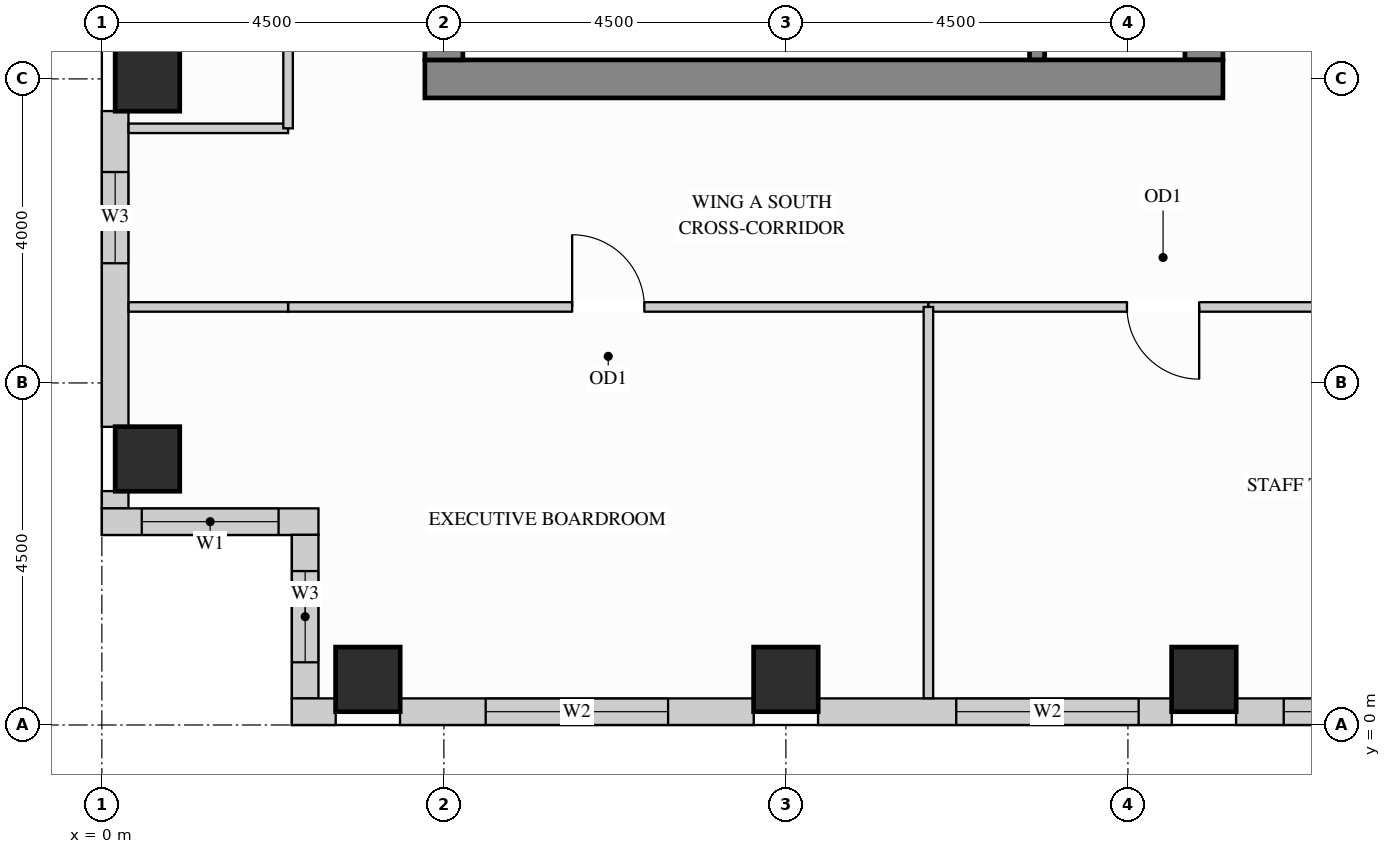
"""IFC4 building model, lengths in metres.
Left out: names, types, materials, properties, quantities, classifications, styles, units other than length and angle.
Written with IfcOpenShell. Run it as: python <this file> out.ifc"""

import sys

from ifc_helpers import new_model, si_unit, direction, frame, frame_2d, origin, origin_2d, place, context, subcontext, project, spatial, rectangle, extrude, source, transform, mapped, element, fill, save


model = new_model("IFC4")
c1 = context("Model", 3, precision=1e-05, world=origin(), true_north=direction((0.0, 1.0)))
c2 = subcontext(c1, "Body", "Model", "MODEL_VIEW")
j1 = project(units=[si_unit("LENGTHUNIT", "METRE"), si_unit("PLANEANGLEUNIT", "RADIAN")], contexts=[c1])
p1 = place(None, origin())
s1 = spatial("IfcSite", under=j1, at=p1, CompositionType="ELEMENT")
p2 = place(p1, origin())
s2 = spatial("IfcBuilding", under=s1, at=p2, CompositionType="ELEMENT")
p3 = place(p2, frame((0.0, 0.0, 237.6)))
s3 = spatial("IfcBuildingStorey", under=s2, at=p3, CompositionType="ELEMENT", Elevation=237.6)
m1 = source(origin(), c2, "Body", "SweptSolid", [
    extrude(rectangle(XDim=0.85, YDim=0.85, at=origin_2d()), origin(), (0.0, 0.0, 1.0), 3.4),
])
for number, where, z_axis, x_axis in (
    (1, (14.5, 0.6, 0.0), (0.0, 0.0, 1.0), (1.0, 0.0, 0.0)),
    (2, (3.5, 0.6, 0.0), (0.0, 0.0, 1.0), (1.0, 0.0, 0.0)),
    (3, (9.0, 0.6, 0.0), (0.0, 0.0, 1.0), (1.0, 0.0, 0.0)),
    (4, (0.6, 3.5, 0.0), (0.0, 0.0, 1.0), (1.0, 0.0, 0.0)),
    (5, (0.6, 8.5, 0.0), (0.0, 0.0, 1.0), (1.0, 0.0, 0.0)),
):
    element("IfcColumn", number, at=place(p3, frame(where, z_axis=z_axis, x_axis=x_axis)), inside=s3, PredefinedType="COLUMN", context=c2, shape_type="MappedRepresentation", body=[
        mapped(m1, transform((0.0, 0.0, 0.0), x_axis=(1.0, 0.0, 0.0), y_axis=(0.0, 1.0, 0.0), z_axis=(0.0, 0.0, 1.0))),
    ])
m2 = source(origin(), c2, "Body", "SweptSolid", [
    extrude(rectangle(XDim=10.07, YDim=0.5, at=frame_2d((5.035, 0.0))), origin(), (0.0, 0.0, 1.0), 3.4),
])
p4 = place(p3, frame((14.5, 8.75, 0.0), z_axis=(0.0, 0.0, 1.0), x_axis=(0.0, 1.0, 0.0)))
e6 = element("IfcWall", 6, at=p4, inside=s3, PredefinedType="SHEAR", context=c2, shape_type="MappedRepresentation", body=[
    mapped(m2, transform((0.0, 0.0, 0.0), x_axis=(1.0, 0.0, 0.0), y_axis=(0.0, 1.0, 0.0), z_axis=(0.0, 0.0, 1.0))),
])
m3 = source(origin(), c2, "Body", "SweptSolid", [
    extrude(rectangle(XDim=10.5, YDim=0.5, at=frame_2d((5.25, 0.0))), origin(), (0.0, 0.0, 1.0), 3.4),
])
p5 = place(p3, frame((4.25, 8.5, 0.0), z_axis=(0.0, 0.0, 1.0), x_axis=(1.0, 0.0, 0.0)))
e7 = element("IfcWall", 7, at=p5, inside=s3, PredefinedType="SHEAR", context=c2, shape_type="MappedRepresentation", body=[
    mapped(m3, transform((0.0, 0.0, 0.0), x_axis=(1.0, 0.0, 0.0), y_axis=(0.0, 1.0, 0.0), z_axis=(0.0, 0.0, 1.0))),
])
m4 = source(origin(), c2, "Body", "SweptSolid", [
    extrude(rectangle(XDim=20.5, YDim=0.5, at=frame_2d((10.25, 0.0))), origin(), (0.0, 0.0, 1.0), 3.4),
])
p6 = place(p3, frame((4.5, 8.75, 0.0), z_axis=(0.0, 0.0, 1.0), x_axis=(0.0, 1.0, 0.0)))
e8 = element("IfcWall", 8, at=p6, inside=s3, PredefinedType="SHEAR", context=c2, shape_type="MappedRepresentation", body=[
    mapped(m4, transform((0.0, 0.0, 0.0), x_axis=(1.0, 0.0, 0.0), y_axis=(0.0, 1.0, 0.0), z_axis=(0.0, 0.0, 1.0))),
])
p7 = place(p3, frame((0.175, 8.077, 0.0), z_axis=(0.0, 0.0, 1.0), x_axis=(0.0, -1.0, 0.0)))
e9 = element("IfcWall", 9, at=p7, inside=s3, PredefinedType="SOLIDWALL", context=c2, shape_type="SweptSolid", body=[
    extrude(rectangle(XDim=4.154, YDim=0.35, at=frame_2d((2.077, 0.0))), origin(), (0.0, 0.0, 1.0), 3.385),
])
p8 = place(p7, frame((0.802, 0.0, 0.78)))
e10 = element("IfcOpeningElement", 10, at=p8, cuts=e9, PredefinedType="OPENING", context=c2, shape_type="SweptSolid", body=[
    extrude(rectangle(XDim=1.2, YDim=2.1, at=frame_2d((0.6, 1.05))), frame((0.0, 0.185, 0.0), z_axis=(0.0, -1.0, 0.0), x_axis=(1.0, 0.0, 0.0)), (0.0, 0.0, 1.0), 0.37),
])
m5 = source(origin(), c2, "Body", "SweptSolid", [
    extrude(rectangle(XDim=0.229, YDim=0.35, at=frame_2d((0.115, 0.0))), origin(), (0.0, 0.0, 1.0), 3.385),
])
p9 = place(p3, frame((0.175, 3.077, 0.0), z_axis=(0.0, 0.0, 1.0), x_axis=(0.0, -1.0, 0.0)))
e11 = element("IfcWall", 11, at=p9, inside=s3, PredefinedType="SOLIDWALL", context=c2, shape_type="MappedRepresentation", body=[
    mapped(m5, transform((0.0, 0.0, 0.0), x_axis=(1.0, 0.0, 0.0), y_axis=(0.0, 1.0, 0.0), z_axis=(0.0, 0.0, 1.0))),
])
p10 = place(p3, frame((0.0, 2.675, 0.0), z_axis=(0.0, 0.0, 1.0), x_axis=(1.0, 0.0, 0.0)))
e12 = element("IfcWall", 12, at=p10, inside=s3, PredefinedType="SOLIDWALL", context=c2, shape_type="SweptSolid", body=[
    extrude(rectangle(XDim=2.85, YDim=0.35, at=frame_2d((1.425, 0.0))), origin(), (0.0, 0.0, 1.0), 3.385),
])
p11 = place(p10, frame((0.525, 0.0, 0.78)))
e13 = element("IfcOpeningElement", 13, at=p11, cuts=e12, PredefinedType="OPENING", context=c2, shape_type="SweptSolid", body=[
    extrude(rectangle(XDim=1.8, YDim=2.1, at=frame_2d((0.9, 1.05))), frame((0.0, 0.185, 0.0), z_axis=(0.0, -1.0, 0.0), x_axis=(1.0, 0.0, 0.0)), (0.0, 0.0, 1.0), 0.37),
])
p12 = place(p3, frame((2.675, 2.502, 0.0), z_axis=(0.0, 0.0, 1.0), x_axis=(0.0, -1.0, 0.0)))
e14 = element("IfcWall", 14, at=p12, inside=s3, PredefinedType="SOLIDWALL", context=c2, shape_type="SweptSolid", body=[
    extrude(rectangle(XDim=2.154, YDim=0.35, at=frame_2d((1.077, 0.0))), origin(), (0.0, 0.0, 1.0), 3.385),
])
p13 = place(p12, frame((0.477, 0.0, 0.78)))
e15 = element("IfcOpeningElement", 15, at=p13, cuts=e14, PredefinedType="OPENING", context=c2, shape_type="SweptSolid", body=[
    extrude(rectangle(XDim=1.2, YDim=2.1, at=frame_2d((0.6, 1.05))), frame((0.0, 0.185, 0.0), z_axis=(0.0, -1.0, 0.0), x_axis=(1.0, 0.0, 0.0)), (0.0, 0.0, 1.0), 0.37),
])
m6 = source(origin(), c2, "Body", "SweptSolid", [
    extrude(rectangle(XDim=0.577, YDim=0.35, at=frame_2d((0.289, 0.0))), origin(), (0.0, 0.0, 1.0), 3.385),
])
p14 = place(p3, frame((2.5, 0.175, 0.0), z_axis=(0.0, 0.0, 1.0), x_axis=(1.0, 0.0, 0.0)))
e16 = element("IfcWall", 16, at=p14, inside=s3, PredefinedType="SOLIDWALL", context=c2, shape_type="MappedRepresentation", body=[
    mapped(m6, transform((0.0, 0.0, 0.0), x_axis=(1.0, 0.0, 0.0), y_axis=(0.0, 1.0, 0.0), z_axis=(0.0, 0.0, 1.0))),
])
p15 = place(p3, frame((3.923, 0.175, 0.0), z_axis=(0.0, 0.0, 1.0), x_axis=(1.0, 0.0, 0.0)))
e17 = element("IfcWall", 17, at=p15, inside=s3, PredefinedType="SOLIDWALL", context=c2, shape_type="SweptSolid", body=[
    extrude(rectangle(XDim=4.654, YDim=0.35, at=frame_2d((2.327, 0.0))), origin(), (0.0, 0.0, 1.0), 3.385),
])
p16 = place(p15, frame((1.127, 0.0, 0.78)))
e18 = element("IfcOpeningElement", 18, at=p16, cuts=e17, PredefinedType="OPENING", context=c2, shape_type="SweptSolid", body=[
    extrude(rectangle(XDim=2.4, YDim=2.1, at=frame_2d((1.2, 1.05))), frame((0.0, 0.185, 0.0), z_axis=(0.0, -1.0, 0.0), x_axis=(1.0, 0.0, 0.0)), (0.0, 0.0, 1.0), 0.37),
])
p17 = place(p3, frame((9.423, 0.175, 0.0), z_axis=(0.0, 0.0, 1.0), x_axis=(1.0, 0.0, 0.0)))
e19 = element("IfcWall", 19, at=p17, inside=s3, PredefinedType="SOLIDWALL", context=c2, shape_type="SweptSolid", body=[
    extrude(rectangle(XDim=4.654, YDim=0.35, at=frame_2d((2.327, 0.0))), origin(), (0.0, 0.0, 1.0), 3.385),
])
p18 = place(p17, frame((1.818, 0.0, 0.78)))
e20 = element("IfcOpeningElement", 20, at=p18, cuts=e19, PredefinedType="OPENING", context=c2, shape_type="SweptSolid", body=[
    extrude(rectangle(XDim=2.4, YDim=2.1, at=frame_2d((1.2, 1.05))), frame((0.0, 0.185, 0.0), z_axis=(0.0, -1.0, 0.0), x_axis=(1.0, 0.0, 0.0)), (0.0, 0.0, 1.0), 0.37),
])
p19 = place(p3, frame((14.923, 0.175, 0.0), z_axis=(0.0, 0.0, 1.0), x_axis=(1.0, 0.0, 0.0)))
e21 = element("IfcWall", 21, at=p19, inside=s3, PredefinedType="SOLIDWALL", context=c2, shape_type="SweptSolid", body=[
    extrude(rectangle(XDim=3.654, YDim=0.35, at=frame_2d((1.827, 0.0))), origin(), (0.0, 0.0, 1.0), 3.385),
])
p20 = place(p19, frame((0.627, 0.0, 0.78)))
e22 = element("IfcOpeningElement", 22, at=p20, cuts=e21, PredefinedType="OPENING", context=c2, shape_type="SweptSolid", body=[
    extrude(rectangle(XDim=2.4, YDim=2.1, at=frame_2d((1.2, 1.05))), frame((0.0, 0.185, 0.0), z_axis=(0.0, -1.0, 0.0), x_axis=(1.0, 0.0, 0.0)), (0.0, 0.0, 1.0), 0.37),
])
m7 = source(origin(), c2, "Body", "SweptSolid", [
    extrude(rectangle(XDim=2.098, YDim=0.125, at=frame_2d((1.049, 0.0))), origin(), (0.0, 0.0, 1.0), 3.385),
])
p21 = place(p3, frame((0.352, 7.85, 0.0), z_axis=(0.0, 0.0, 1.0), x_axis=(1.0, 0.0, 0.0)))
e23 = element("IfcWall", 23, at=p21, inside=s3, PredefinedType="PARTITIONING", context=c2, shape_type="MappedRepresentation", body=[
    mapped(m7, transform((0.0, 0.0, 0.0), x_axis=(1.0, 0.0, 0.0), y_axis=(0.0, 1.0, 0.0), z_axis=(0.0, 0.0, 1.0))),
])
p22 = place(p3, frame((2.45, 5.5, 0.0), z_axis=(0.0, 0.0, 1.0), x_axis=(1.0, 0.0, 0.0)))
e24 = element("IfcWall", 24, at=p22, inside=s3, PredefinedType="PARTITIONING", context=c2, shape_type="SweptSolid", body=[
    extrude(rectangle(XDim=8.425, YDim=0.125, at=frame_2d((4.212, 0.0))), origin(), (0.0, 0.0, 1.0), 3.385),
])
p23 = place(p22, frame((3.738, 0.0, 0.0)))
e25 = element("IfcOpeningElement", 25, at=p23, cuts=e24, PredefinedType="OPENING", context=c2, shape_type="SweptSolid", body=[
    extrude(rectangle(XDim=0.95, YDim=2.15, at=frame_2d((0.475, 1.075))), frame((0.0, 0.073, 0.0), z_axis=(0.0, -1.0, 0.0), x_axis=(1.0, 0.0, 0.0)), (0.0, 0.0, 1.0), 0.145),
])
p24 = place(p3, frame((10.875, 5.5, 0.0), z_axis=(0.0, 0.0, 1.0), x_axis=(1.0, 0.0, 0.0)))
e26 = element("IfcWall", 26, at=p24, inside=s3, PredefinedType="PARTITIONING", context=c2, shape_type="SweptSolid", body=[
    extrude(rectangle(XDim=6.175, YDim=0.125, at=frame_2d((3.087, 0.0))), origin(), (0.0, 0.0, 1.0), 3.385),
])
p25 = place(p24, frame((2.613, 0.0, 0.0)))
e27 = element("IfcOpeningElement", 27, at=p25, cuts=e26, PredefinedType="OPENING", context=c2, shape_type="SweptSolid", body=[
    extrude(rectangle(XDim=0.95, YDim=2.15, at=frame_2d((0.475, 1.075))), frame((0.0, 0.073, 0.0), z_axis=(0.0, -1.0, 0.0), x_axis=(1.0, 0.0, 0.0)), (0.0, 0.0, 1.0), 0.145),
])
p26 = place(p3, frame((0.352, 5.5, 0.0), z_axis=(0.0, 0.0, 1.0), x_axis=(1.0, 0.0, 0.0)))
e28 = element("IfcWall", 28, at=p26, inside=s3, PredefinedType="PARTITIONING", context=c2, shape_type="MappedRepresentation", body=[
    mapped(m7, transform((0.0, 0.0, 0.0), x_axis=(1.0, 0.0, 0.0), y_axis=(0.0, 1.0, 0.0), z_axis=(0.0, 0.0, 1.0))),
])
m8 = source(origin(), c2, "Body", "SweptSolid", [
    extrude(rectangle(XDim=5.148, YDim=0.125, at=frame_2d((2.574, 0.0))), origin(), (0.0, 0.0, 1.0), 3.385),
])
p27 = place(p3, frame((10.875, 0.352, 0.0), z_axis=(0.0, 0.0, 1.0), x_axis=(0.0, 1.0, 0.0)))
e29 = element("IfcWall", 29, at=p27, inside=s3, PredefinedType="PARTITIONING", context=c2, shape_type="MappedRepresentation", body=[
    mapped(m8, transform((0.0, 0.0, 0.0), x_axis=(1.0, 0.0, 0.0), y_axis=(0.0, 1.0, 0.0), z_axis=(0.0, 0.0, 1.0))),
])
p28 = place(p3, frame((2.45, 7.85, 0.0), z_axis=(0.0, 0.0, 1.0), x_axis=(0.0, 1.0, 0.0)))
e30 = element("IfcWall", 30, at=p28, inside=s3, PredefinedType="PARTITIONING", context=c2, shape_type="SweptSolid", body=[
    extrude(rectangle(XDim=7.25, YDim=0.125, at=frame_2d((3.625, 0.0))), origin(), (0.0, 0.0, 1.0), 3.385),
])
p29 = place(p28, frame((3.15, 0.0, 0.0)))
e31 = element("IfcOpeningElement", 31, at=p29, cuts=e30, PredefinedType="OPENING", context=c2, shape_type="SweptSolid", body=[
    extrude(rectangle(XDim=0.95, YDim=2.15, at=frame_2d((0.475, 1.075))), frame((0.0, 0.073, 0.0), z_axis=(0.0, -1.0, 0.0), x_axis=(1.0, 0.0, 0.0)), (0.0, 0.0, 1.0), 0.145),
])
m9 = source(origin(), c2, "Body", "SweptSolid", [
    extrude(rectangle(XDim=3.803, YDim=0.2, at=frame_2d((1.901, 0.0))), origin(), (0.0, 0.0, 1.0), 3.4),
])
p30 = place(p3, frame((12.305, 8.752, 0.0), z_axis=(0.0, 0.0, 1.0), x_axis=(0.0, 1.0, 0.0)))
e32 = element("IfcWall", 32, at=p30, inside=s3, PredefinedType="SHEAR", context=c2, shape_type="MappedRepresentation", body=[
    mapped(m9, transform((0.0, 0.0, 0.0), x_axis=(1.0, 0.0, 0.0), y_axis=(0.0, 1.0, 0.0), z_axis=(0.0, 0.0, 1.0))),
])
m10 = source(origin(), c2, "Body", "SweptSolid", [
    extrude(rectangle(XDim=0.95, YDim=2.15, at=frame_2d((0.475, 1.075))), frame((0.0, 0.025, 0.0), z_axis=(0.0, -1.0, 0.0), x_axis=(1.0, 0.0, 0.0)), (0.0, 0.0, 1.0), 0.05),
])
p31 = place(p23, origin())
e33 = element("IfcDoor", 33, at=p31, inside=s3, OperationType="SINGLE_SWING_LEFT", PredefinedType="DOOR", context=c2, shape_type="MappedRepresentation", body=[
    mapped(m10, transform((0.0, 0.0, 0.0), x_axis=(1.0, 0.0, 0.0), y_axis=(0.0, 1.0, 0.0), z_axis=(0.0, 0.0, 1.0))),
])
fill(e25, e33)
p32 = place(p25, origin())
e34 = element("IfcDoor", 34, at=p32, inside=s3, OperationType="SINGLE_SWING_RIGHT", PredefinedType="DOOR", context=c2, shape_type="MappedRepresentation", body=[
    mapped(m10, transform((0.0, 0.0, 0.0), x_axis=(1.0, 0.0, 0.0), y_axis=(0.0, 1.0, 0.0), z_axis=(0.0, 0.0, 1.0))),
])
fill(e27, e34)
m11 = source(origin(), c2, "Body", "SweptSolid", [
    extrude(rectangle(XDim=1.8, YDim=2.1, at=frame_2d((0.9, 1.05))), frame((0.0, 0.03, 0.0), z_axis=(0.0, -1.0, 0.0), x_axis=(1.0, 0.0, 0.0)), (0.0, 0.0, 1.0), 0.06),
])
p33 = place(p11, origin())
e35 = element("IfcWindow", 35, at=p33, inside=s3, PartitioningType="SINGLE_PANEL", PredefinedType="WINDOW", context=c2, shape_type="MappedRepresentation", body=[
    mapped(m11, transform((0.0, 0.0, 0.0), x_axis=(1.0, 0.0, 0.0), y_axis=(0.0, 1.0, 0.0), z_axis=(0.0, 0.0, 1.0))),
])
fill(e13, e35)
m12 = source(origin(), c2, "Body", "SweptSolid", [
    extrude(rectangle(XDim=2.4, YDim=2.1, at=frame_2d((1.2, 1.05))), frame((0.0, 0.03, 0.0), z_axis=(0.0, -1.0, 0.0), x_axis=(1.0, 0.0, 0.0)), (0.0, 0.0, 1.0), 0.06),
])
p34 = place(p16, origin())
e36 = element("IfcWindow", 36, at=p34, inside=s3, PartitioningType="SINGLE_PANEL", PredefinedType="WINDOW", context=c2, shape_type="MappedRepresentation", body=[
    mapped(m12, transform((0.0, 0.0, 0.0), x_axis=(1.0, 0.0, 0.0), y_axis=(0.0, 1.0, 0.0), z_axis=(0.0, 0.0, 1.0))),
])
fill(e18, e36)
p35 = place(p18, origin())
e37 = element("IfcWindow", 37, at=p35, inside=s3, PartitioningType="SINGLE_PANEL", PredefinedType="WINDOW", context=c2, shape_type="MappedRepresentation", body=[
    mapped(m12, transform((0.0, 0.0, 0.0), x_axis=(1.0, 0.0, 0.0), y_axis=(0.0, 1.0, 0.0), z_axis=(0.0, 0.0, 1.0))),
])
fill(e20, e37)
p36 = place(p20, origin())
e38 = element("IfcWindow", 38, at=p36, inside=s3, PartitioningType="SINGLE_PANEL", PredefinedType="WINDOW", context=c2, shape_type="MappedRepresentation", body=[
    mapped(m12, transform((0.0, 0.0, 0.0), x_axis=(1.0, 0.0, 0.0), y_axis=(0.0, 1.0, 0.0), z_axis=(0.0, 0.0, 1.0))),
])
fill(e22, e38)
m13 = source(origin(), c2, "Body", "SweptSolid", [
    extrude(rectangle(XDim=1.2, YDim=2.1, at=frame_2d((0.6, 1.05))), frame((0.0, 0.03, 0.0), z_axis=(0.0, -1.0, 0.0), x_axis=(1.0, 0.0, 0.0)), (0.0, 0.0, 1.0), 0.06),
])
p37 = place(p8, origin())
e39 = element("IfcWindow", 39, at=p37, inside=s3, PartitioningType="SINGLE_PANEL", PredefinedType="WINDOW", context=c2, shape_type="MappedRepresentation", body=[
    mapped(m13, transform((0.0, 0.0, 0.0), x_axis=(1.0, 0.0, 0.0), y_axis=(0.0, 1.0, 0.0), z_axis=(0.0, 0.0, 1.0))),
])
fill(e10, e39)
p38 = place(p13, origin())
e40 = element("IfcWindow", 40, at=p38, inside=s3, PartitioningType="SINGLE_PANEL", PredefinedType="WINDOW", context=c2, shape_type="MappedRepresentation", body=[
    mapped(m13, transform((0.0, 0.0, 0.0), x_axis=(1.0, 0.0, 0.0), y_axis=(0.0, 1.0, 0.0), z_axis=(0.0, 0.0, 1.0))),
])
fill(e15, e40)
save(model, sys.argv[1])
